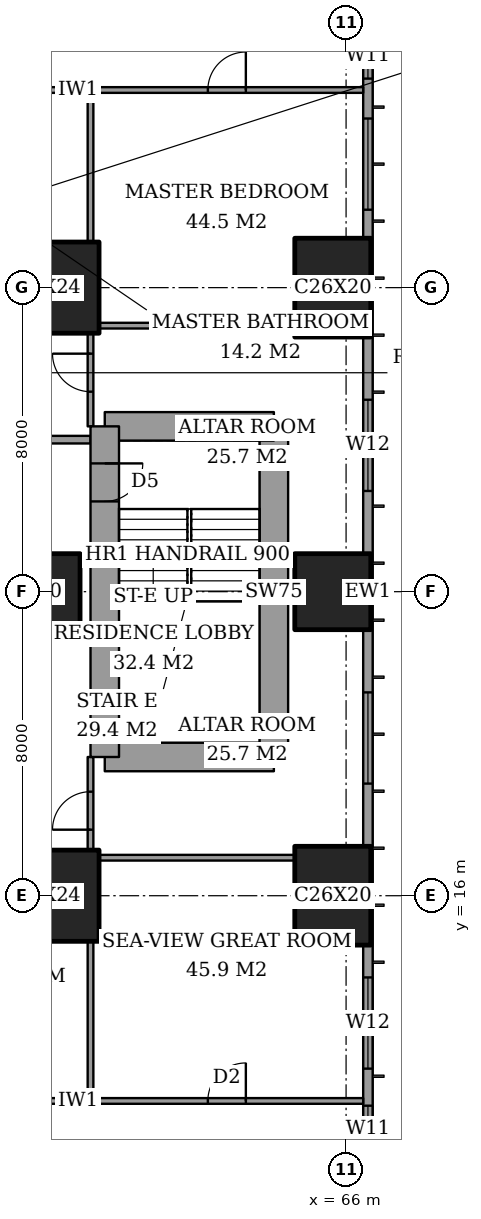
"""IFC4 building model, lengths in metres.
Left out: names, types, materials, properties, quantities, classifications, styles, units other than length and angle.
Written with IfcOpenShell. Run it as: python <this file> out.ifc"""

import sys

from ifc_helpers import new_model, si_unit, direction, frame, frame_2d, origin, origin_2d, place, context, subcontext, project, spatial, rectangle, extrude, element, fill, save


model = new_model("IFC4")
c1 = context("Model", 3, precision=1e-05, world=origin(), true_north=direction((0.0, 1.0)))
c2 = subcontext(c1, "Body", "Model", "MODEL_VIEW")
j1 = project(units=[si_unit("LENGTHUNIT", "METRE"), si_unit("PLANEANGLEUNIT", "RADIAN")], contexts=[c1])
p1 = place(None, origin())
s1 = spatial("IfcSite", under=j1, at=p1, CompositionType="ELEMENT")
p2 = place(p1, origin())
s2 = spatial("IfcBuilding", under=s1, at=p2, CompositionType="ELEMENT")
p3 = place(p2, frame((0.0, 0.0, 146.6)))
s3 = spatial("IfcBuildingStorey", under=s2, at=p3, CompositionType="ELEMENT", Elevation=146.6)
p4 = place(p3, frame((58.0, 16.0, 0.0), z_axis=(0.0, 0.0, 1.0), x_axis=(1.0, 0.0, 0.0)))
e1 = element("IfcColumn", 1, at=p4, inside=s3, PredefinedType="COLUMN", context=c2, shape_type="SweptSolid", body=[
    extrude(rectangle(XDim=3.0, YDim=2.4, at=origin_2d()), origin(), (0.0, 0.0, 1.0), 3.6),
])
p5 = place(p3, frame((58.0, 24.0, 0.0), z_axis=(0.0, 0.0, 1.0), x_axis=(1.0, 0.0, 0.0)))
e2 = element("IfcColumn", 2, at=p5, inside=s3, PredefinedType="COLUMN", context=c2, shape_type="SweptSolid", body=[
    extrude(rectangle(XDim=2.0, YDim=2.0, at=origin_2d()), origin(), (0.0, 0.0, 1.0), 3.6),
])
p6 = place(p3, frame((58.0, 32.0, 0.0), z_axis=(0.0, 0.0, 1.0), x_axis=(1.0, 0.0, 0.0)))
e3 = element("IfcColumn", 3, at=p6, inside=s3, PredefinedType="COLUMN", context=c2, shape_type="SweptSolid", body=[
    extrude(rectangle(XDim=3.0, YDim=2.4, at=origin_2d()), origin(), (0.0, 0.0, 1.0), 3.6),
])
p7 = place(p3, frame((65.65, 16.0, 0.0), z_axis=(0.0, 0.0, 1.0), x_axis=(0.0, 1.0, 0.0)))
e4 = element("IfcColumn", 4, at=p7, inside=s3, PredefinedType="COLUMN", context=c2, shape_type="SweptSolid", body=[
    extrude(rectangle(XDim=2.6, YDim=2.0, at=origin_2d()), origin(), (0.0, 0.0, 1.0), 3.6),
])
p8 = place(p3, frame((65.65, 24.0, 0.0), z_axis=(0.0, 0.0, 1.0), x_axis=(1.0, 0.0, 0.0)))
e5 = element("IfcColumn", 5, at=p8, inside=s3, PredefinedType="COLUMN", context=c2, shape_type="SweptSolid", body=[
    extrude(rectangle(XDim=2.0, YDim=2.0, at=origin_2d()), origin(), (0.0, 0.0, 1.0), 3.6),
])
p9 = place(p3, frame((65.65, 32.0, 0.0), z_axis=(0.0, 0.0, 1.0), x_axis=(0.0, 1.0, 0.0)))
e6 = element("IfcColumn", 6, at=p9, inside=s3, PredefinedType="COLUMN", context=c2, shape_type="SweptSolid", body=[
    extrude(rectangle(XDim=2.6, YDim=2.0, at=origin_2d()), origin(), (0.0, 0.0, 1.0), 3.6),
])
p10 = place(p3, frame((59.65, 19.65, 0.0), z_axis=(0.0, 0.0, 1.0), x_axis=(1.0, 0.0, 0.0)))
e7 = element("IfcWall", 7, at=p10, inside=s3, PredefinedType="SHEAR", context=c2, shape_type="SweptSolid", body=[
    extrude(rectangle(XDim=4.45, YDim=0.75, at=frame_2d((2.225, 0.0))), origin(), (0.0, 0.0, 1.0), 3.6),
])
p11 = place(p3, frame((64.1, 19.65, 0.0), z_axis=(0.0, 0.0, 1.0), x_axis=(0.0, 1.0, 0.0)))
e8 = element("IfcWall", 8, at=p11, inside=s3, PredefinedType="SHEAR", context=c2, shape_type="SweptSolid", body=[
    extrude(rectangle(XDim=8.7, YDim=0.75, at=frame_2d((4.35, 0.0))), origin(), (0.0, 0.0, 1.0), 3.6),
])
p12 = place(p3, frame((64.1, 28.35, 0.0), z_axis=(0.0, 0.0, 1.0), x_axis=(-1.0, 0.0, 0.0)))
e9 = element("IfcWall", 9, at=p12, inside=s3, PredefinedType="SHEAR", context=c2, shape_type="SweptSolid", body=[
    extrude(rectangle(XDim=4.45, YDim=0.75, at=frame_2d((2.225, 0.0))), origin(), (0.0, 0.0, 1.0), 3.6),
])
p13 = place(p3, frame((59.65, 28.35, 0.0), z_axis=(0.0, 0.0, 1.0), x_axis=(0.0, -1.0, 0.0)))
e10 = element("IfcWall", 10, at=p13, inside=s3, PredefinedType="SHEAR", context=c2, shape_type="SweptSolid", body=[
    extrude(rectangle(XDim=8.7, YDim=0.75, at=frame_2d((4.35, 0.0))), origin(), (0.0, 0.0, 1.0), 3.6),
])
p14 = place(p13, frame((0.975, 0.0, 0.0)))
e11 = element("IfcOpeningElement", 11, at=p14, cuts=e10, PredefinedType="OPENING", context=c2, shape_type="SweptSolid", body=[
    extrude(rectangle(XDim=1.0, YDim=2.1, at=frame_2d((0.5, 1.05))), frame((0.0, 0.385, 0.0), z_axis=(0.0, -1.0, 0.0), x_axis=(1.0, 0.0, 0.0)), (0.0, 0.0, 1.0), 0.77),
])
p15 = place(p3, frame((66.575, 3.175, 0.0), z_axis=(0.0, 0.0, 1.0), x_axis=(0.0, 1.0, 0.0)))
e12 = element("IfcWall", 12, at=p15, inside=s3, PredefinedType="SOLIDWALL", context=c2, shape_type="SweptSolid", body=[
    extrude(rectangle(XDim=41.65, YDim=0.25, at=frame_2d((20.825, 0.0))), origin(), (0.0, 0.0, 1.0), 3.6),
])
p16 = place(p15, frame((0.775, 0.0, 0.4)))
e13 = element("IfcOpeningElement", 13, at=p16, cuts=e12, PredefinedType="OPENING", context=c2, shape_type="SweptSolid", body=[
    extrude(rectangle(XDim=2.4, YDim=2.2, at=frame_2d((1.2, 1.1))), frame((0.0, 0.135, 0.0), z_axis=(0.0, -1.0, 0.0), x_axis=(1.0, 0.0, 0.0)), (0.0, 0.0, 1.0), 0.27),
])
p17 = place(p15, frame((6.1, 0.0, 0.4)))
e14 = element("IfcOpeningElement", 14, at=p17, cuts=e12, PredefinedType="OPENING", context=c2, shape_type="SweptSolid", body=[
    extrude(rectangle(XDim=1.2, YDim=2.2, at=frame_2d((0.6, 1.1))), frame((0.0, 0.135, 0.0), z_axis=(0.0, -1.0, 0.0), x_axis=(1.0, 0.0, 0.0)), (0.0, 0.0, 1.0), 0.27),
])
p18 = place(p15, frame((8.275, 0.0, 0.4)))
e15 = element("IfcOpeningElement", 15, at=p18, cuts=e12, PredefinedType="OPENING", context=c2, shape_type="SweptSolid", body=[
    extrude(rectangle(XDim=2.4, YDim=2.2, at=frame_2d((1.2, 1.1))), frame((0.0, 0.135, 0.0), z_axis=(0.0, -1.0, 0.0), x_axis=(1.0, 0.0, 0.0)), (0.0, 0.0, 1.0), 0.27),
])
p19 = place(p15, frame((15.775, 0.0, 0.4)))
e16 = element("IfcOpeningElement", 16, at=p19, cuts=e12, PredefinedType="OPENING", context=c2, shape_type="SweptSolid", body=[
    extrude(rectangle(XDim=2.4, YDim=2.2, at=frame_2d((1.2, 1.1))), frame((0.0, 0.135, 0.0), z_axis=(0.0, -1.0, 0.0), x_axis=(1.0, 0.0, 0.0)), (0.0, 0.0, 1.0), 0.27),
])
p20 = place(p15, frame((23.475, 0.0, 0.4)))
e17 = element("IfcOpeningElement", 17, at=p20, cuts=e12, PredefinedType="OPENING", context=c2, shape_type="SweptSolid", body=[
    extrude(rectangle(XDim=2.4, YDim=2.2, at=frame_2d((1.2, 1.1))), frame((0.0, 0.135, 0.0), z_axis=(0.0, -1.0, 0.0), x_axis=(1.0, 0.0, 0.0)), (0.0, 0.0, 1.0), 0.27),
])
p21 = place(p15, frame((30.875, 0.0, 0.4)))
e18 = element("IfcOpeningElement", 18, at=p21, cuts=e12, PredefinedType="OPENING", context=c2, shape_type="SweptSolid", body=[
    extrude(rectangle(XDim=2.4, YDim=2.2, at=frame_2d((1.2, 1.1))), frame((0.0, 0.135, 0.0), z_axis=(0.0, -1.0, 0.0), x_axis=(1.0, 0.0, 0.0)), (0.0, 0.0, 1.0), 0.27),
])
p22 = place(p15, frame((34.325, 0.0, 0.4)))
e19 = element("IfcOpeningElement", 19, at=p22, cuts=e12, PredefinedType="OPENING", context=c2, shape_type="SweptSolid", body=[
    extrude(rectangle(XDim=1.2, YDim=2.2, at=frame_2d((0.6, 1.1))), frame((0.0, 0.135, 0.0), z_axis=(0.0, -1.0, 0.0), x_axis=(1.0, 0.0, 0.0)), (0.0, 0.0, 1.0), 0.27),
])
p23 = place(p15, frame((38.475, 0.0, 0.4)))
e20 = element("IfcOpeningElement", 20, at=p23, cuts=e12, PredefinedType="OPENING", context=c2, shape_type="SweptSolid", body=[
    extrude(rectangle(XDim=2.4, YDim=2.2, at=frame_2d((1.2, 1.1))), frame((0.0, 0.135, 0.0), z_axis=(0.0, -1.0, 0.0), x_axis=(1.0, 0.0, 0.0)), (0.0, 0.0, 1.0), 0.27),
])
p24 = place(p3, frame((41.439, 10.6, 0.0), z_axis=(0.0, 0.0, 1.0), x_axis=(1.0, 0.0, 0.0)))
e21 = element("IfcWall", 21, at=p24, inside=s3, PredefinedType="PARTITIONING", context=c2, shape_type="SweptSolid", body=[
    extrude(rectangle(XDim=25.011, YDim=0.15, at=frame_2d((12.505, 0.0))), origin(), (0.0, 0.0, 1.0), 3.35),
])
p25 = place(p24, frame((11.961, 0.0, 0.0)))
e22 = element("IfcOpeningElement", 22, at=p25, cuts=e21, PredefinedType="OPENING", context=c2, shape_type="SweptSolid", body=[
    extrude(rectangle(XDim=1.0, YDim=2.1, at=frame_2d((0.5, 1.05))), frame((0.0, 0.085, 0.0), z_axis=(0.0, -1.0, 0.0), x_axis=(1.0, 0.0, 0.0)), (0.0, 0.0, 1.0), 0.17),
])
p26 = place(p24, frame((20.924, 0.0, 0.0)))
e23 = element("IfcOpeningElement", 23, at=p26, cuts=e21, PredefinedType="OPENING", context=c2, shape_type="SweptSolid", body=[
    extrude(rectangle(XDim=1.0, YDim=2.1, at=frame_2d((0.5, 1.05))), frame((0.0, 0.085, 0.0), z_axis=(0.0, -1.0, 0.0), x_axis=(1.0, 0.0, 0.0)), (0.0, 0.0, 1.0), 0.17),
])
p27 = place(p24, frame((15.249, 0.0, 0.0)))
e24 = element("IfcOpeningElement", 24, at=p27, cuts=e21, PredefinedType="OPENING", context=c2, shape_type="SweptSolid", body=[
    extrude(rectangle(XDim=0.9, YDim=2.1, at=frame_2d((0.45, 1.05))), frame((0.0, 0.085, 0.0), z_axis=(0.0, -1.0, 0.0), x_axis=(1.0, 0.0, 0.0)), (0.0, 0.0, 1.0), 0.17),
])
p28 = place(p24, frame((9.661, 0.0, 0.0)))
e25 = element("IfcOpeningElement", 25, at=p28, cuts=e21, PredefinedType="OPENING", context=c2, shape_type="SweptSolid", body=[
    extrude(rectangle(XDim=1.0, YDim=2.1, at=frame_2d((0.5, 1.05))), frame((0.0, 0.085, 0.0), z_axis=(0.0, -1.0, 0.0), x_axis=(1.0, 0.0, 0.0)), (0.0, 0.0, 1.0), 0.17),
])
p29 = place(p24, frame((7.311, 0.0, 0.0)))
e26 = element("IfcOpeningElement", 26, at=p29, cuts=e21, PredefinedType="OPENING", context=c2, shape_type="SweptSolid", body=[
    extrude(rectangle(XDim=0.9, YDim=2.1, at=frame_2d((0.45, 1.05))), frame((0.0, 0.085, 0.0), z_axis=(0.0, -1.0, 0.0), x_axis=(1.0, 0.0, 0.0)), (0.0, 0.0, 1.0), 0.17),
])
p30 = place(p24, frame((2.836, 0.0, 0.0)))
e27 = element("IfcOpeningElement", 27, at=p30, cuts=e21, PredefinedType="OPENING", context=c2, shape_type="SweptSolid", body=[
    extrude(rectangle(XDim=1.0, YDim=2.1, at=frame_2d((0.5, 1.05))), frame((0.0, 0.085, 0.0), z_axis=(0.0, -1.0, 0.0), x_axis=(1.0, 0.0, 0.0)), (0.0, 0.0, 1.0), 0.17),
])
p31 = place(p3, frame((59.5, 17.0, 0.0), z_axis=(0.0, 0.0, 1.0), x_axis=(1.0, 0.0, 0.0)))
e28 = element("IfcWall", 28, at=p31, inside=s3, PredefinedType="PARTITIONING", context=c2, shape_type="SweptSolid", body=[
    extrude(rectangle(XDim=5.15, YDim=0.15, at=frame_2d((2.575, 0.0))), origin(), (0.0, 0.0, 1.0), 3.35),
])
p32 = place(p3, frame((42.0, 28.0, 0.0), z_axis=(0.0, 0.0, 1.0), x_axis=(1.0, 0.0, 0.0)))
e29 = element("IfcWall", 29, at=p32, inside=s3, PredefinedType="PARTITIONING", context=c2, shape_type="SweptSolid", body=[
    extrude(rectangle(XDim=17.275, YDim=0.2, at=frame_2d((8.637, 0.0))), origin(), (0.0, 0.0, 1.0), 3.35),
])
p33 = place(p32, frame((9.4, 0.0, 0.0)))
e30 = element("IfcOpeningElement", 30, at=p33, cuts=e29, PredefinedType="OPENING", context=c2, shape_type="SweptSolid", body=[
    extrude(rectangle(XDim=1.2, YDim=2.4, at=frame_2d((0.6, 1.2))), frame((0.0, 0.11, 0.0), z_axis=(0.0, -1.0, 0.0), x_axis=(1.0, 0.0, 0.0)), (0.0, 0.0, 1.0), 0.22),
])
p34 = place(p3, frame((59.5, 31.0, 0.0), z_axis=(0.0, 0.0, 1.0), x_axis=(1.0, 0.0, 0.0)))
e31 = element("IfcWall", 31, at=p34, inside=s3, PredefinedType="PARTITIONING", context=c2, shape_type="SweptSolid", body=[
    extrude(rectangle(XDim=5.15, YDim=0.15, at=frame_2d((2.575, 0.0))), origin(), (0.0, 0.0, 1.0), 3.35),
])
p35 = place(p3, frame((41.439, 37.2, 0.0), z_axis=(0.0, 0.0, 1.0), x_axis=(1.0, 0.0, 0.0)))
e32 = element("IfcWall", 32, at=p35, inside=s3, PredefinedType="PARTITIONING", context=c2, shape_type="SweptSolid", body=[
    extrude(rectangle(XDim=25.011, YDim=0.15, at=frame_2d((12.505, 0.0))), origin(), (0.0, 0.0, 1.0), 3.35),
])
p36 = place(p35, frame((10.761, 0.0, 0.0)))
e33 = element("IfcOpeningElement", 33, at=p36, cuts=e32, PredefinedType="OPENING", context=c2, shape_type="SweptSolid", body=[
    extrude(rectangle(XDim=1.0, YDim=2.1, at=frame_2d((0.5, 1.05))), frame((0.0, 0.085, 0.0), z_axis=(0.0, -1.0, 0.0), x_axis=(1.0, 0.0, 0.0)), (0.0, 0.0, 1.0), 0.17),
])
p37 = place(p35, frame((20.924, 0.0, 0.0)))
e34 = element("IfcOpeningElement", 34, at=p37, cuts=e32, PredefinedType="OPENING", context=c2, shape_type="SweptSolid", body=[
    extrude(rectangle(XDim=1.0, YDim=2.1, at=frame_2d((0.5, 1.05))), frame((0.0, 0.085, 0.0), z_axis=(0.0, -1.0, 0.0), x_axis=(1.0, 0.0, 0.0)), (0.0, 0.0, 1.0), 0.17),
])
p38 = place(p35, frame((15.749, 0.0, 0.0)))
e35 = element("IfcOpeningElement", 35, at=p38, cuts=e32, PredefinedType="OPENING", context=c2, shape_type="SweptSolid", body=[
    extrude(rectangle(XDim=0.9, YDim=2.1, at=frame_2d((0.45, 1.05))), frame((0.0, 0.085, 0.0), z_axis=(0.0, -1.0, 0.0), x_axis=(1.0, 0.0, 0.0)), (0.0, 0.0, 1.0), 0.17),
])
p39 = place(p35, frame((12.961, 0.0, 0.0)))
e36 = element("IfcOpeningElement", 36, at=p39, cuts=e32, PredefinedType="OPENING", context=c2, shape_type="SweptSolid", body=[
    extrude(rectangle(XDim=1.0, YDim=2.1, at=frame_2d((0.5, 1.05))), frame((0.0, 0.085, 0.0), z_axis=(0.0, -1.0, 0.0), x_axis=(1.0, 0.0, 0.0)), (0.0, 0.0, 1.0), 0.17),
])
p40 = place(p35, frame((7.911, 0.0, 0.0)))
e37 = element("IfcOpeningElement", 37, at=p40, cuts=e32, PredefinedType="OPENING", context=c2, shape_type="SweptSolid", body=[
    extrude(rectangle(XDim=0.9, YDim=2.1, at=frame_2d((0.45, 1.05))), frame((0.0, 0.085, 0.0), z_axis=(0.0, -1.0, 0.0), x_axis=(1.0, 0.0, 0.0)), (0.0, 0.0, 1.0), 0.17),
])
p41 = place(p35, frame((2.836, 0.0, 0.0)))
e38 = element("IfcOpeningElement", 38, at=p41, cuts=e32, PredefinedType="OPENING", context=c2, shape_type="SweptSolid", body=[
    extrude(rectangle(XDim=1.0, YDim=2.1, at=frame_2d((0.5, 1.05))), frame((0.0, 0.085, 0.0), z_axis=(0.0, -1.0, 0.0), x_axis=(1.0, 0.0, 0.0)), (0.0, 0.0, 1.0), 0.17),
])
p42 = place(p3, frame((59.275, 10.6, 0.0), z_axis=(0.0, 0.0, 1.0), x_axis=(0.0, 1.0, 0.0)))
e39 = element("IfcWall", 39, at=p42, inside=s3, PredefinedType="PARTITIONING", context=c2, shape_type="SweptSolid", body=[
    extrude(rectangle(XDim=4.2, YDim=0.15, at=frame_2d((2.1, 0.0))), origin(), (0.0, 0.0, 1.0), 3.35),
])
p43 = place(p3, frame((59.275, 17.2, 0.0), z_axis=(0.0, 0.0, 1.0), x_axis=(0.0, 1.0, 0.0)))
e40 = element("IfcWall", 40, at=p43, inside=s3, PredefinedType="PARTITIONING", context=c2, shape_type="SweptSolid", body=[
    extrude(rectangle(XDim=2.45, YDim=0.15, at=frame_2d((1.225, 0.0))), origin(), (0.0, 0.0, 1.0), 3.35),
])
p44 = place(p43, frame((0.538, 0.0, 0.0)))
e41 = element("IfcOpeningElement", 41, at=p44, cuts=e40, PredefinedType="OPENING", context=c2, shape_type="SweptSolid", body=[
    extrude(rectangle(XDim=1.0, YDim=2.1, at=frame_2d((0.5, 1.05))), frame((0.0, 0.085, 0.0), z_axis=(0.0, -1.0, 0.0), x_axis=(1.0, 0.0, 0.0)), (0.0, 0.0, 1.0), 0.17),
])
p45 = place(p3, frame((59.275, 28.35, 0.0), z_axis=(0.0, 0.0, 1.0), x_axis=(0.0, 1.0, 0.0)))
e42 = element("IfcWall", 42, at=p45, inside=s3, PredefinedType="PARTITIONING", context=c2, shape_type="SweptSolid", body=[
    extrude(rectangle(XDim=2.45, YDim=0.15, at=frame_2d((1.225, 0.0))), origin(), (0.0, 0.0, 1.0), 3.35),
])
p46 = place(p45, frame((0.913, 0.0, 0.0)))
e43 = element("IfcOpeningElement", 43, at=p46, cuts=e42, PredefinedType="OPENING", context=c2, shape_type="SweptSolid", body=[
    extrude(rectangle(XDim=1.0, YDim=2.1, at=frame_2d((0.5, 1.05))), frame((0.0, 0.085, 0.0), z_axis=(0.0, -1.0, 0.0), x_axis=(1.0, 0.0, 0.0)), (0.0, 0.0, 1.0), 0.17),
])
p47 = place(p3, frame((59.275, 33.2, 0.0), z_axis=(0.0, 0.0, 1.0), x_axis=(0.0, 1.0, 0.0)))
e44 = element("IfcWall", 44, at=p47, inside=s3, PredefinedType="PARTITIONING", context=c2, shape_type="SweptSolid", body=[
    extrude(rectangle(XDim=4.0, YDim=0.15, at=frame_2d((2.0, 0.0))), origin(), (0.0, 0.0, 1.0), 3.35),
])
p48 = place(p17, origin())
e45 = element("IfcWindow", 45, at=p48, inside=s3, PartitioningType="SINGLE_PANEL", PredefinedType="WINDOW", context=c2, shape_type="SweptSolid", body=[
    extrude(rectangle(XDim=1.2, YDim=2.2, at=frame_2d((0.6, 1.1))), frame((0.0, 0.03, 0.0), z_axis=(0.0, -1.0, 0.0), x_axis=(1.0, 0.0, 0.0)), (0.0, 0.0, 1.0), 0.06),
])
fill(e14, e45)
p49 = place(p18, origin())
e46 = element("IfcWindow", 46, at=p49, inside=s3, PartitioningType="SINGLE_PANEL", PredefinedType="WINDOW", context=c2, shape_type="SweptSolid", body=[
    extrude(rectangle(XDim=2.4, YDim=2.2, at=frame_2d((1.2, 1.1))), frame((0.0, 0.03, 0.0), z_axis=(0.0, -1.0, 0.0), x_axis=(1.0, 0.0, 0.0)), (0.0, 0.0, 1.0), 0.06),
])
fill(e15, e46)
p50 = place(p19, origin())
e47 = element("IfcWindow", 47, at=p50, inside=s3, PartitioningType="SINGLE_PANEL", PredefinedType="WINDOW", context=c2, shape_type="SweptSolid", body=[
    extrude(rectangle(XDim=2.4, YDim=2.2, at=frame_2d((1.2, 1.1))), frame((0.0, 0.03, 0.0), z_axis=(0.0, -1.0, 0.0), x_axis=(1.0, 0.0, 0.0)), (0.0, 0.0, 1.0), 0.06),
])
fill(e16, e47)
p51 = place(p20, origin())
e48 = element("IfcWindow", 48, at=p51, inside=s3, PartitioningType="SINGLE_PANEL", PredefinedType="WINDOW", context=c2, shape_type="SweptSolid", body=[
    extrude(rectangle(XDim=2.4, YDim=2.2, at=frame_2d((1.2, 1.1))), frame((0.0, 0.03, 0.0), z_axis=(0.0, -1.0, 0.0), x_axis=(1.0, 0.0, 0.0)), (0.0, 0.0, 1.0), 0.06),
])
fill(e17, e48)
p52 = place(p21, origin())
e49 = element("IfcWindow", 49, at=p52, inside=s3, PartitioningType="SINGLE_PANEL", PredefinedType="WINDOW", context=c2, shape_type="SweptSolid", body=[
    extrude(rectangle(XDim=2.4, YDim=2.2, at=frame_2d((1.2, 1.1))), frame((0.0, 0.03, 0.0), z_axis=(0.0, -1.0, 0.0), x_axis=(1.0, 0.0, 0.0)), (0.0, 0.0, 1.0), 0.06),
])
fill(e18, e49)
p53 = place(p22, origin())
e50 = element("IfcWindow", 50, at=p53, inside=s3, PartitioningType="SINGLE_PANEL", PredefinedType="WINDOW", context=c2, shape_type="SweptSolid", body=[
    extrude(rectangle(XDim=1.2, YDim=2.2, at=frame_2d((0.6, 1.1))), frame((0.0, 0.03, 0.0), z_axis=(0.0, -1.0, 0.0), x_axis=(1.0, 0.0, 0.0)), (0.0, 0.0, 1.0), 0.06),
])
fill(e19, e50)
p54 = place(p26, origin())
e51 = element("IfcDoor", 51, at=p54, inside=s3, OperationType="SINGLE_SWING_LEFT", PredefinedType="DOOR", context=c2, shape_type="SweptSolid", body=[
    extrude(rectangle(XDim=1.0, YDim=2.1, at=frame_2d((0.5, 1.05))), frame((0.0, 0.025, 0.0), z_axis=(0.0, -1.0, 0.0), x_axis=(1.0, 0.0, 0.0)), (0.0, 0.0, 1.0), 0.05),
])
fill(e23, e51)
p55 = place(p44, origin())
e52 = element("IfcDoor", 52, at=p55, inside=s3, OperationType="SINGLE_SWING_RIGHT", PredefinedType="DOOR", context=c2, shape_type="SweptSolid", body=[
    extrude(rectangle(XDim=1.0, YDim=2.1, at=frame_2d((0.5, 1.05))), frame((0.0, 0.025, 0.0), z_axis=(0.0, -1.0, 0.0), x_axis=(1.0, 0.0, 0.0)), (0.0, 0.0, 1.0), 0.05),
])
fill(e41, e52)
p56 = place(p37, origin())
e53 = element("IfcDoor", 53, at=p56, inside=s3, OperationType="SINGLE_SWING_LEFT", PredefinedType="DOOR", context=c2, shape_type="SweptSolid", body=[
    extrude(rectangle(XDim=1.0, YDim=2.1, at=frame_2d((0.5, 1.05))), frame((0.0, 0.025, 0.0), z_axis=(0.0, -1.0, 0.0), x_axis=(1.0, 0.0, 0.0)), (0.0, 0.0, 1.0), 0.05),
])
fill(e34, e53)
p57 = place(p46, origin())
e54 = element("IfcDoor", 54, at=p57, inside=s3, OperationType="SINGLE_SWING_LEFT", PredefinedType="DOOR", context=c2, shape_type="SweptSolid", body=[
    extrude(rectangle(XDim=1.0, YDim=2.1, at=frame_2d((0.5, 1.05))), frame((0.0, 0.025, 0.0), z_axis=(0.0, -1.0, 0.0), x_axis=(1.0, 0.0, 0.0)), (0.0, 0.0, 1.0), 0.05),
])
fill(e43, e54)
p58 = place(p14, origin())
e55 = element("IfcDoor", 55, at=p58, inside=s3, OperationType="SINGLE_SWING_RIGHT", PredefinedType="DOOR", context=c2, shape_type="SweptSolid", body=[
    extrude(rectangle(XDim=1.0, YDim=2.1, at=frame_2d((0.5, 1.05))), frame((0.0, 0.025, 0.0), z_axis=(0.0, -1.0, 0.0), x_axis=(1.0, 0.0, 0.0)), (0.0, 0.0, 1.0), 0.05),
])
fill(e11, e55)
save(model, sys.argv[1])
